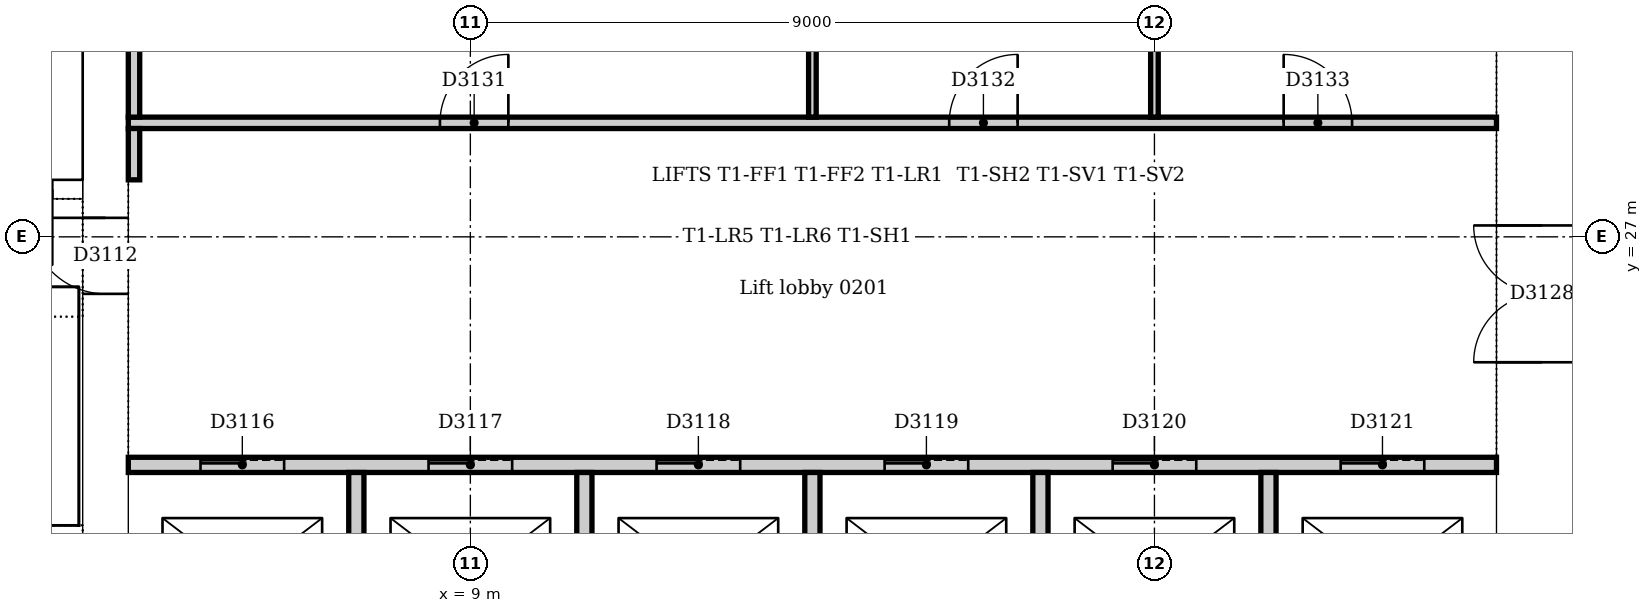
"""IFC4 building model, lengths in metres.
Left out: names, types, materials, properties, quantities, classifications, styles, units other than length and angle.
Written with IfcOpenShell. Run it as: python <this file> out.ifc"""

import sys

from ifc_helpers import new_model, si_unit, direction, frame, frame_2d, origin, place, context, subcontext, project, spatial, rectangle, extrude, element, fill, save


model = new_model("IFC4")
c1 = context("Model", 3, precision=1e-05, world=origin(), true_north=direction((0.0, 1.0)))
c2 = subcontext(c1, "Body", "Model", "MODEL_VIEW")
j1 = project(units=[si_unit("LENGTHUNIT", "METRE"), si_unit("PLANEANGLEUNIT", "RADIAN")], contexts=[c1])
p1 = place(None, origin())
s1 = spatial("IfcSite", under=j1, at=p1, CompositionType="ELEMENT")
p2 = place(p1, origin())
s2 = spatial("IfcBuilding", under=s1, at=p2, CompositionType="ELEMENT")
p3 = place(p2, frame((0.0, 0.0, 11.0)))
s3 = spatial("IfcBuildingStorey", under=s2, at=p3, CompositionType="ELEMENT", Elevation=11.0)
p4 = place(p3, frame((23.1, 21.0, 0.0), z_axis=(0.0, 0.0, 1.0), x_axis=(0.0, 1.0, 0.0)))
e1 = element("IfcWall", 1, at=p4, inside=s3, PredefinedType="SOLIDWALL", context=c2, shape_type="SweptSolid", body=[
    extrude(rectangle(XDim=10.5, YDim=1.2, at=frame_2d((5.25, 0.0))), origin(), (0.0, 0.0, 1.0), 5.0),
])
p5 = place(p4, frame((4.35, 0.0, 0.0)))
e2 = element("IfcOpeningElement", 2, at=p5, cuts=e1, PredefinedType="OPENING", context=c2, shape_type="SweptSolid", body=[
    extrude(rectangle(XDim=1.8, YDim=2.1, at=frame_2d((0.9, 1.05))), frame((0.0, 0.61, 0.0), z_axis=(0.0, -1.0, 0.0), x_axis=(1.0, 0.0, 0.0)), (0.0, 0.0, 1.0), 1.22),
])
p6 = place(p3, frame((4.2, 31.5, 0.0), z_axis=(0.0, 0.0, 1.0), x_axis=(0.0, -1.0, 0.0)))
e3 = element("IfcWall", 3, at=p6, inside=s3, PredefinedType="SOLIDWALL", context=c2, shape_type="SweptSolid", body=[
    extrude(rectangle(XDim=10.5, YDim=0.6, at=frame_2d((5.25, 0.0))), origin(), (0.0, 0.0, 1.0), 5.0),
])
p7 = place(p6, frame((4.25, 0.0, 0.0)))
e4 = element("IfcOpeningElement", 4, at=p7, cuts=e3, PredefinedType="OPENING", context=c2, shape_type="SweptSolid", body=[
    extrude(rectangle(XDim=1.0, YDim=2.1, at=frame_2d((0.5, 1.05))), frame((0.0, 0.31, 0.0), z_axis=(0.0, -1.0, 0.0), x_axis=(1.0, 0.0, 0.0)), (0.0, 0.0, 1.0), 0.62),
])
p8 = place(p3, frame((3.9, 27.625, 0.0), z_axis=(0.0, 0.0, 1.0), x_axis=(-1.0, 0.0, 0.0)))
e5 = element("IfcWall", 5, at=p8, inside=s3, PredefinedType="SOLIDWALL", context=c2, shape_type="SweptSolid", body=[
    extrude(rectangle(XDim=3.54, YDim=0.25, at=frame_2d((1.77, 0.0))), origin(), (0.0, 0.0, 1.0), 5.0),
])
p9 = place(p8, frame((0.4, 0.0, 0.0)))
e6 = element("IfcOpeningElement", 6, at=p9, cuts=e5, PredefinedType="OPENING", context=c2, shape_type="SweptSolid", body=[
    extrude(rectangle(XDim=1.0, YDim=2.1, at=frame_2d((0.5, 1.05))), frame((0.0, 0.135, 0.0), z_axis=(0.0, -1.0, 0.0), x_axis=(1.0, 0.0, 0.0)), (0.0, 0.0, 1.0), 0.27),
])
p10 = place(p3, frame((4.5, 24.0, 0.0), z_axis=(0.0, 0.0, 1.0), x_axis=(1.0, 0.0, 0.0)))
e7 = element("IfcWall", 7, at=p10, inside=s3, PredefinedType="PARTITIONING", context=c2, shape_type="SweptSolid", body=[
    extrude(rectangle(XDim=18.0, YDim=0.2, at=frame_2d((9.0, 0.0))), origin(), (0.0, 0.0, 1.0), 4.7),
])
p11 = place(p10, frame((0.95, 0.0, 0.0)))
e8 = element("IfcOpeningElement", 8, at=p11, cuts=e7, PredefinedType="OPENING", context=c2, shape_type="SweptSolid", body=[
    extrude(rectangle(XDim=1.1, YDim=2.1, at=frame_2d((0.55, 1.05))), frame((0.0, 0.11, 0.0), z_axis=(0.0, -1.0, 0.0), x_axis=(1.0, 0.0, 0.0)), (0.0, 0.0, 1.0), 0.22),
])
p12 = place(p10, frame((3.95, 0.0, 0.0)))
e9 = element("IfcOpeningElement", 9, at=p12, cuts=e7, PredefinedType="OPENING", context=c2, shape_type="SweptSolid", body=[
    extrude(rectangle(XDim=1.1, YDim=2.1, at=frame_2d((0.55, 1.05))), frame((0.0, 0.11, 0.0), z_axis=(0.0, -1.0, 0.0), x_axis=(1.0, 0.0, 0.0)), (0.0, 0.0, 1.0), 0.22),
])
p13 = place(p10, frame((6.95, 0.0, 0.0)))
e10 = element("IfcOpeningElement", 10, at=p13, cuts=e7, PredefinedType="OPENING", context=c2, shape_type="SweptSolid", body=[
    extrude(rectangle(XDim=1.1, YDim=2.1, at=frame_2d((0.55, 1.05))), frame((0.0, 0.11, 0.0), z_axis=(0.0, -1.0, 0.0), x_axis=(1.0, 0.0, 0.0)), (0.0, 0.0, 1.0), 0.22),
])
p14 = place(p10, frame((9.95, 0.0, 0.0)))
e11 = element("IfcOpeningElement", 11, at=p14, cuts=e7, PredefinedType="OPENING", context=c2, shape_type="SweptSolid", body=[
    extrude(rectangle(XDim=1.1, YDim=2.1, at=frame_2d((0.55, 1.05))), frame((0.0, 0.11, 0.0), z_axis=(0.0, -1.0, 0.0), x_axis=(1.0, 0.0, 0.0)), (0.0, 0.0, 1.0), 0.22),
])
p15 = place(p10, frame((12.95, 0.0, 0.0)))
e12 = element("IfcOpeningElement", 12, at=p15, cuts=e7, PredefinedType="OPENING", context=c2, shape_type="SweptSolid", body=[
    extrude(rectangle(XDim=1.1, YDim=2.1, at=frame_2d((0.55, 1.05))), frame((0.0, 0.11, 0.0), z_axis=(0.0, -1.0, 0.0), x_axis=(1.0, 0.0, 0.0)), (0.0, 0.0, 1.0), 0.22),
])
p16 = place(p10, frame((15.95, 0.0, 0.0)))
e13 = element("IfcOpeningElement", 13, at=p16, cuts=e7, PredefinedType="OPENING", context=c2, shape_type="SweptSolid", body=[
    extrude(rectangle(XDim=1.1, YDim=2.1, at=frame_2d((0.55, 1.05))), frame((0.0, 0.11, 0.0), z_axis=(0.0, -1.0, 0.0), x_axis=(1.0, 0.0, 0.0)), (0.0, 0.0, 1.0), 0.22),
])
for number, where, z_axis, x_axis in (
    (14, (7.5, 21.0, 0.0), (0.0, 0.0, 1.0), (0.0, 1.0, 0.0)),
    (15, (10.5, 21.0, 0.0), (0.0, 0.0, 1.0), (0.0, 1.0, 0.0)),
    (16, (13.5, 21.0, 0.0), (0.0, 0.0, 1.0), (0.0, 1.0, 0.0)),
    (17, (16.5, 21.0, 0.0), (0.0, 0.0, 1.0), (0.0, 1.0, 0.0)),
    (18, (19.5, 21.0, 0.0), (0.0, 0.0, 1.0), (0.0, 1.0, 0.0)),
):
    element("IfcWall", number, at=place(p3, frame(where, z_axis=z_axis, x_axis=x_axis)), inside=s3, PredefinedType="PARTITIONING", context=c2, shape_type="SweptSolid", body=[
        extrude(rectangle(XDim=2.9, YDim=0.2, at=frame_2d((1.45, 0.0))), origin(), (0.0, 0.0, 1.0), 4.7),
    ])
p17 = place(p3, frame((4.5, 28.5, 0.0), z_axis=(0.0, 0.0, 1.0), x_axis=(1.0, 0.0, 0.0)))
e19 = element("IfcWall", 19, at=p17, inside=s3, PredefinedType="PARTITIONING", context=c2, shape_type="SweptSolid", body=[
    extrude(rectangle(XDim=18.0, YDim=0.15, at=frame_2d((9.0, 0.0))), origin(), (0.0, 0.0, 1.0), 4.7),
])
p18 = place(p17, frame((4.1, 0.0, 0.0)))
e20 = element("IfcOpeningElement", 20, at=p18, cuts=e19, PredefinedType="OPENING", context=c2, shape_type="SweptSolid", body=[
    extrude(rectangle(XDim=0.9, YDim=2.1, at=frame_2d((0.45, 1.05))), frame((0.0, 0.085, 0.0), z_axis=(0.0, -1.0, 0.0), x_axis=(1.0, 0.0, 0.0)), (0.0, 0.0, 1.0), 0.17),
])
p19 = place(p17, frame((10.8, 0.0, 0.0)))
e21 = element("IfcOpeningElement", 21, at=p19, cuts=e19, PredefinedType="OPENING", context=c2, shape_type="SweptSolid", body=[
    extrude(rectangle(XDim=0.9, YDim=2.1, at=frame_2d((0.45, 1.05))), frame((0.0, 0.085, 0.0), z_axis=(0.0, -1.0, 0.0), x_axis=(1.0, 0.0, 0.0)), (0.0, 0.0, 1.0), 0.17),
])
p20 = place(p17, frame((15.2, 0.0, 0.0)))
e22 = element("IfcOpeningElement", 22, at=p20, cuts=e19, PredefinedType="OPENING", context=c2, shape_type="SweptSolid", body=[
    extrude(rectangle(XDim=0.9, YDim=2.1, at=frame_2d((0.45, 1.05))), frame((0.0, 0.085, 0.0), z_axis=(0.0, -1.0, 0.0), x_axis=(1.0, 0.0, 0.0)), (0.0, 0.0, 1.0), 0.17),
])
p21 = place(p3, frame((4.575, 27.75, 0.0), z_axis=(0.0, 0.0, 1.0), x_axis=(0.0, 1.0, 0.0)))
e23 = element("IfcWall", 23, at=p21, inside=s3, PredefinedType="PARTITIONING", context=c2, shape_type="SweptSolid", body=[
    extrude(rectangle(XDim=0.675, YDim=0.15, at=frame_2d((0.338, 0.0))), origin(), (0.0, 0.0, 1.0), 4.7),
])
p22 = place(p3, frame((4.575, 28.575, 0.0), z_axis=(0.0, 0.0, 1.0), x_axis=(0.0, 1.0, 0.0)))
e24 = element("IfcWall", 24, at=p22, inside=s3, PredefinedType="PARTITIONING", context=c2, shape_type="SweptSolid", body=[
    extrude(rectangle(XDim=2.675, YDim=0.15, at=frame_2d((1.337, 0.0))), origin(), (0.0, 0.0, 1.0), 4.7),
])
for number, where, z_axis, x_axis in (
    (25, (13.5, 28.575, 0.0), (0.0, 0.0, 1.0), (0.0, 1.0, 0.0)),
    (26, (18.0, 28.575, 0.0), (0.0, 0.0, 1.0), (0.0, 1.0, 0.0)),
):
    element("IfcWall", number, at=place(p3, frame(where, z_axis=z_axis, x_axis=x_axis)), inside=s3, PredefinedType="PARTITIONING", context=c2, shape_type="SweptSolid", body=[
        extrude(rectangle(XDim=2.675, YDim=0.1, at=frame_2d((1.337, 0.0))), origin(), (0.0, 0.0, 1.0), 4.7),
    ])
p23 = place(p7, frame((1.0, 0.0, 0.0), z_axis=(0.0, 0.0, 1.0), x_axis=(-1.0, 0.0, 0.0)))
e27 = element("IfcDoor", 27, at=p23, inside=s3, OperationType="SINGLE_SWING_RIGHT", PredefinedType="DOOR", context=c2, shape_type="SweptSolid", body=[
    extrude(rectangle(XDim=1.0, YDim=2.1, at=frame_2d((0.5, 1.05))), frame((0.0, 0.025, 0.0), z_axis=(0.0, -1.0, 0.0), x_axis=(1.0, 0.0, 0.0)), (0.0, 0.0, 1.0), 0.05),
])
fill(e4, e27)
p24 = place(p11, origin())
e28 = element("IfcDoor", 28, at=p24, inside=s3, OperationType="SLIDING_TO_LEFT", PredefinedType="DOOR", context=c2, shape_type="SweptSolid", body=[
    extrude(rectangle(XDim=1.1, YDim=2.1, at=frame_2d((0.55, 1.05))), frame((0.0, 0.025, 0.0), z_axis=(0.0, -1.0, 0.0), x_axis=(1.0, 0.0, 0.0)), (0.0, 0.0, 1.0), 0.05),
])
fill(e8, e28)
p25 = place(p12, origin())
e29 = element("IfcDoor", 29, at=p25, inside=s3, OperationType="SLIDING_TO_LEFT", PredefinedType="DOOR", context=c2, shape_type="SweptSolid", body=[
    extrude(rectangle(XDim=1.1, YDim=2.1, at=frame_2d((0.55, 1.05))), frame((0.0, 0.025, 0.0), z_axis=(0.0, -1.0, 0.0), x_axis=(1.0, 0.0, 0.0)), (0.0, 0.0, 1.0), 0.05),
])
fill(e9, e29)
p26 = place(p13, origin())
e30 = element("IfcDoor", 30, at=p26, inside=s3, OperationType="SLIDING_TO_LEFT", PredefinedType="DOOR", context=c2, shape_type="SweptSolid", body=[
    extrude(rectangle(XDim=1.1, YDim=2.1, at=frame_2d((0.55, 1.05))), frame((0.0, 0.025, 0.0), z_axis=(0.0, -1.0, 0.0), x_axis=(1.0, 0.0, 0.0)), (0.0, 0.0, 1.0), 0.05),
])
fill(e10, e30)
p27 = place(p14, origin())
e31 = element("IfcDoor", 31, at=p27, inside=s3, OperationType="SLIDING_TO_LEFT", PredefinedType="DOOR", context=c2, shape_type="SweptSolid", body=[
    extrude(rectangle(XDim=1.1, YDim=2.1, at=frame_2d((0.55, 1.05))), frame((0.0, 0.025, 0.0), z_axis=(0.0, -1.0, 0.0), x_axis=(1.0, 0.0, 0.0)), (0.0, 0.0, 1.0), 0.05),
])
fill(e11, e31)
p28 = place(p15, origin())
e32 = element("IfcDoor", 32, at=p28, inside=s3, OperationType="SLIDING_TO_LEFT", PredefinedType="DOOR", context=c2, shape_type="SweptSolid", body=[
    extrude(rectangle(XDim=1.1, YDim=2.1, at=frame_2d((0.55, 1.05))), frame((0.0, 0.025, 0.0), z_axis=(0.0, -1.0, 0.0), x_axis=(1.0, 0.0, 0.0)), (0.0, 0.0, 1.0), 0.05),
])
fill(e12, e32)
p29 = place(p16, origin())
e33 = element("IfcDoor", 33, at=p29, inside=s3, OperationType="SLIDING_TO_LEFT", PredefinedType="DOOR", context=c2, shape_type="SweptSolid", body=[
    extrude(rectangle(XDim=1.1, YDim=2.1, at=frame_2d((0.55, 1.05))), frame((0.0, 0.025, 0.0), z_axis=(0.0, -1.0, 0.0), x_axis=(1.0, 0.0, 0.0)), (0.0, 0.0, 1.0), 0.05),
])
fill(e13, e33)
p30 = place(p5, origin())
e34 = element("IfcDoor", 34, at=p30, inside=s3, OperationType="DOUBLE_DOOR_DOUBLE_SWING", PredefinedType="DOOR", context=c2, shape_type="SweptSolid", body=[
    extrude(rectangle(XDim=1.8, YDim=2.1, at=frame_2d((0.9, 1.05))), frame((0.0, 0.025, 0.0), z_axis=(0.0, -1.0, 0.0), x_axis=(1.0, 0.0, 0.0)), (0.0, 0.0, 1.0), 0.05),
])
fill(e2, e34)
p31 = place(p18, origin())
e35 = element("IfcDoor", 35, at=p31, inside=s3, OperationType="SINGLE_SWING_RIGHT", PredefinedType="DOOR", context=c2, shape_type="SweptSolid", body=[
    extrude(rectangle(XDim=0.9, YDim=2.1, at=frame_2d((0.45, 1.05))), frame((0.0, 0.025, 0.0), z_axis=(0.0, -1.0, 0.0), x_axis=(1.0, 0.0, 0.0)), (0.0, 0.0, 1.0), 0.05),
])
fill(e20, e35)
p32 = place(p19, origin())
e36 = element("IfcDoor", 36, at=p32, inside=s3, OperationType="SINGLE_SWING_RIGHT", PredefinedType="DOOR", context=c2, shape_type="SweptSolid", body=[
    extrude(rectangle(XDim=0.9, YDim=2.1, at=frame_2d((0.45, 1.05))), frame((0.0, 0.025, 0.0), z_axis=(0.0, -1.0, 0.0), x_axis=(1.0, 0.0, 0.0)), (0.0, 0.0, 1.0), 0.05),
])
fill(e21, e36)
p33 = place(p20, origin())
e37 = element("IfcDoor", 37, at=p33, inside=s3, OperationType="SINGLE_SWING_LEFT", PredefinedType="DOOR", context=c2, shape_type="SweptSolid", body=[
    extrude(rectangle(XDim=0.9, YDim=2.1, at=frame_2d((0.45, 1.05))), frame((0.0, 0.025, 0.0), z_axis=(0.0, -1.0, 0.0), x_axis=(1.0, 0.0, 0.0)), (0.0, 0.0, 1.0), 0.05),
])
fill(e22, e37)
save(model, sys.argv[1])
